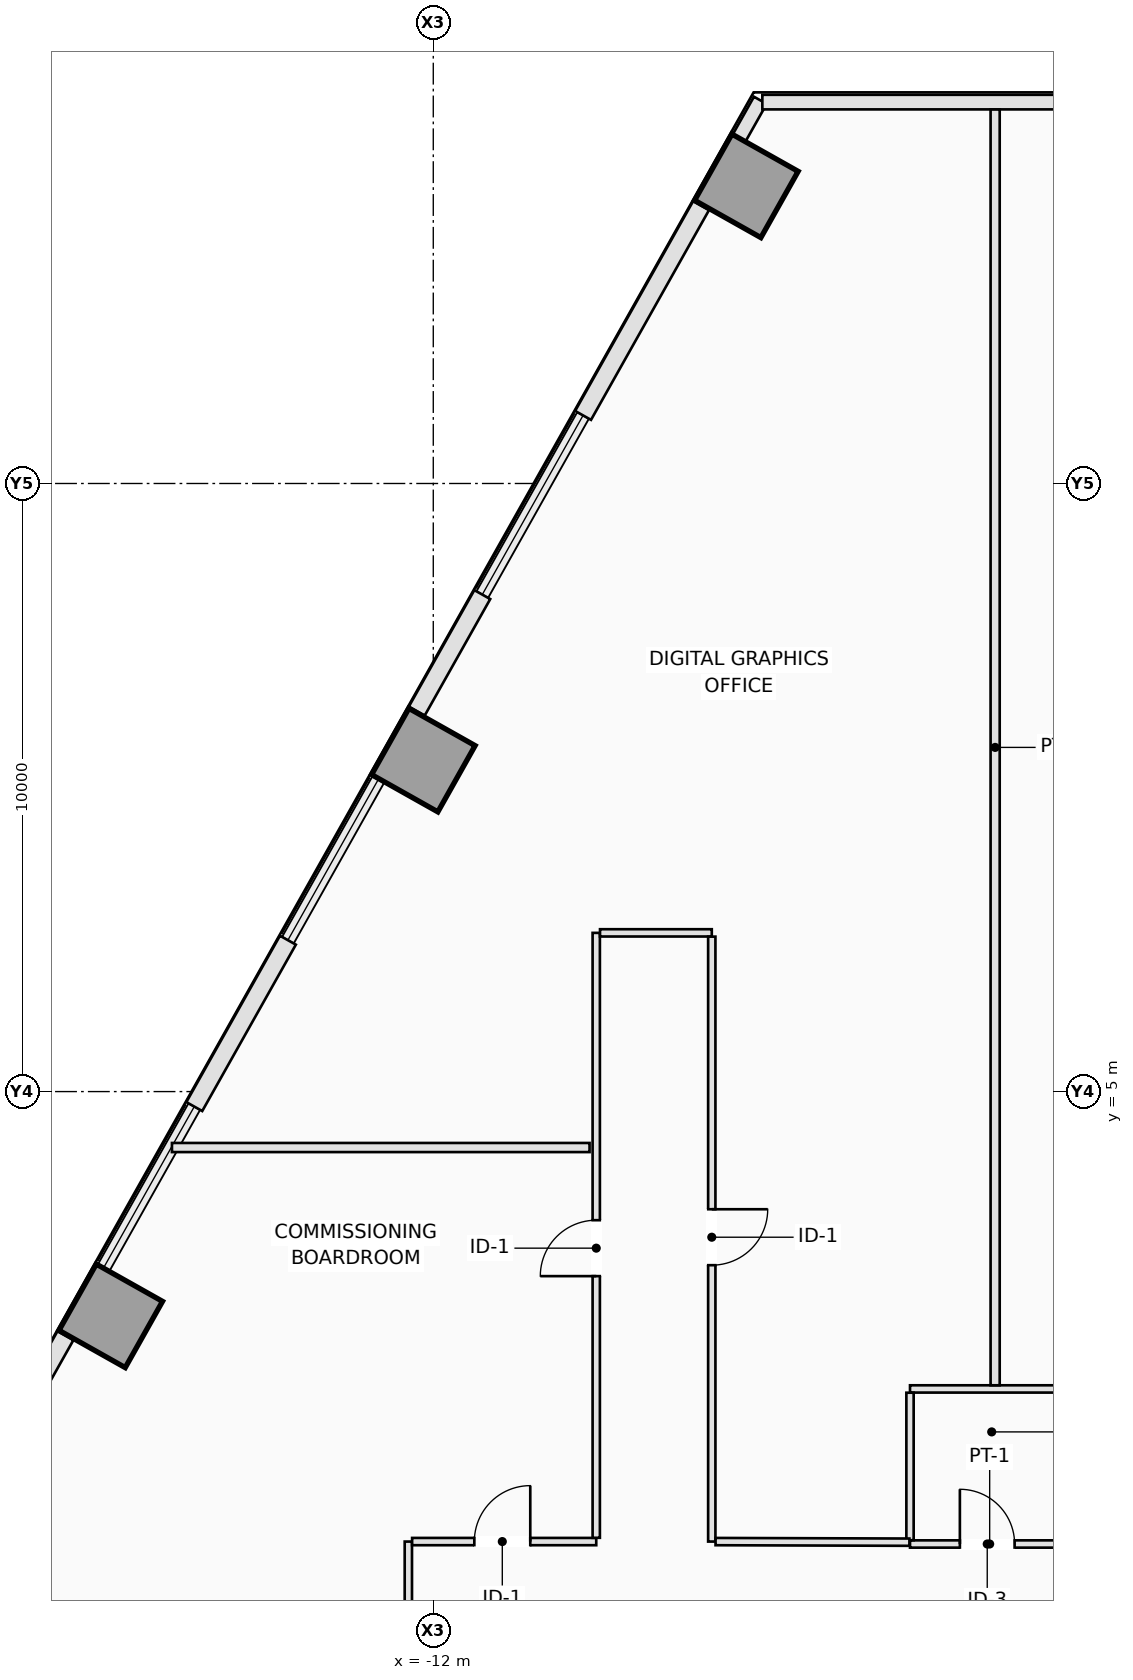
"""IFC4 building model, lengths in metres.
Left out: names, types, materials, properties, quantities, classifications, styles, units other than length and angle.
Written with IfcOpenShell. Run it as: python <this file> out.ifc"""

import sys

from ifc_helpers import new_model, si_unit, direction, frame, frame_2d, origin, origin_2d, place, context, subcontext, project, spatial, rectangle, extrude, element, fill, save


model = new_model("IFC4")
c1 = context("Model", 3, precision=1e-05, world=origin(), true_north=direction((0.0, 1.0)))
c2 = subcontext(c1, "Body", "Model", "MODEL_VIEW")
j1 = project(units=[si_unit("LENGTHUNIT", "METRE"), si_unit("PLANEANGLEUNIT", "RADIAN")], contexts=[c1])
p1 = place(None, origin())
s1 = spatial("IfcSite", under=j1, at=p1, CompositionType="ELEMENT")
p2 = place(p1, origin())
s2 = spatial("IfcBuilding", under=s1, at=p2, CompositionType="ELEMENT")
p3 = place(p2, frame((0.0, 0.0, 62.6)))
s3 = spatial("IfcBuildingStorey", under=s2, at=p3, CompositionType="ELEMENT", Elevation=62.6)
for number, where, z_axis, x_axis in (
    (1, (-6.851, 19.895, 0.0), (0.0, 0.0, 1.0), (-0.872, 0.49, 0.0)),
    (2, (-12.163, 10.451, 0.0), (0.0, 0.0, 1.0), (-0.872, 0.49, 0.0)),
    (3, (-17.304, 1.312, 0.0), (0.0, 0.0, 1.0), (-0.872, 0.49, 0.0)),
):
    element("IfcColumn", number, at=place(p3, frame(where, z_axis=z_axis, x_axis=x_axis)), inside=s3, PredefinedType="COLUMN", context=c2, shape_type="SweptSolid", body=[
        extrude(rectangle(XDim=1.25, YDim=1.25, at=origin_2d()), origin(), (0.0, 0.0, 1.0), 3.5),
    ])
p4 = place(p3, frame((-6.969, 20.684, 0.0), z_axis=(0.0, 0.0, 1.0), x_axis=(0.490261239633, 0.871575537125, 0.0)))
e4 = element("IfcWall", 4, at=p4, inside=s3, PredefinedType="STANDARD", context=c2, shape_type="SweptSolid", body=[
    extrude(rectangle(XDim=0.708, YDim=0.24, at=frame_2d((0.354, 0.0))), origin(), (0.0, 0.0, 1.0), 3.25),
])
p5 = place(p3, frame((-19.127, -0.93, 0.0), z_axis=(0.0, 0.0, 1.0), x_axis=(0.490277063651, 0.871566635925, 0.0)))
e5 = element("IfcWall", 5, at=p5, inside=s3, PredefinedType="STANDARD", context=c2, shape_type="SweptSolid", body=[
    extrude(rectangle(XDim=2.198, YDim=0.3, at=frame_2d((1.099, 0.0))), origin(), (0.0, 0.0, 1.0), 3.25),
])
p6 = place(p3, frame((-12.271, 11.258, 0.0), z_axis=(0.0, 0.0, 1.0), x_axis=(0.490324540864, 0.871539927156, 0.0)))
e6 = element("IfcWall", 6, at=p6, inside=s3, PredefinedType="STANDARD", context=c2, shape_type="SweptSolid", body=[
    extrude(rectangle(XDim=2.197, YDim=0.3, at=frame_2d((1.099, 0.0))), origin(), (0.0, 0.0, 1.0), 3.25),
])
p7 = place(p3, frame((-9.537, 16.12, 0.0), z_axis=(0.0, 0.0, 1.0), x_axis=(0.490240735008, 0.871587070659, 0.0)))
e7 = element("IfcWall", 7, at=p7, inside=s3, PredefinedType="STANDARD", context=c2, shape_type="SweptSolid", body=[
    extrude(rectangle(XDim=3.957, YDim=0.3, at=frame_2d((1.979, 0.0))), origin(), (0.0, 0.0, 1.0), 3.25),
])
p8 = place(p3, frame((-15.93, 4.753, 0.0), z_axis=(0.0, 0.0, 1.0), x_axis=(0.490290775148, 0.871558922738, 0.0)))
e8 = element("IfcWall", 8, at=p8, inside=s3, PredefinedType="STANDARD", context=c2, shape_type="SweptSolid", body=[
    extrude(rectangle(XDim=3.14, YDim=0.3, at=frame_2d((1.57, 0.0))), origin(), (0.0, 0.0, 1.0), 3.25),
])
p9 = place(p3, frame((6.598, 21.272, 0.0), z_axis=(0.0, 0.0, 1.0), x_axis=(-1.0, 0.0, 0.0)))
e9 = element("IfcWall", 9, at=p9, inside=s3, PredefinedType="STANDARD", context=c2, shape_type="SweptSolid", body=[
    extrude(rectangle(XDim=13.187, YDim=0.24, at=frame_2d((6.593, 0.0))), origin(), (0.0, 0.0, 1.0), 3.25),
])
p10 = place(p9, frame((5.693, 0.0, 0.9)))
e10 = element("IfcOpeningElement", 10, at=p10, cuts=e9, PredefinedType="OPENING", context=c2, shape_type="SweptSolid", body=[
    extrude(rectangle(XDim=1.8, YDim=2.1, at=frame_2d((0.9, 1.05))), frame((0.0, 0.13, 0.0), z_axis=(0.0, -1.0, 0.0), x_axis=(1.0, 0.0, 0.0)), (0.0, 0.0, 1.0), 0.26),
])
p11 = place(p3, frame((-4.16, -2.44, 0.0), z_axis=(0.0, 0.0, 1.0), x_axis=(1.0, 0.0, 0.0)))
e11 = element("IfcWall", 11, at=p11, inside=s3, PredefinedType="PARTITIONING", context=c2, shape_type="SweptSolid", body=[
    extrude(rectangle(XDim=2.62, YDim=0.12, at=frame_2d((1.31, 0.0))), origin(), (0.0, 0.0, 1.0), 3.25),
])
p12 = place(p11, frame((0.82, 0.0, 0.0)))
e12 = element("IfcOpeningElement", 12, at=p12, cuts=e11, PredefinedType="OPENING", context=c2, shape_type="SweptSolid", body=[
    extrude(rectangle(XDim=0.9, YDim=2.12, at=frame_2d((0.45, 1.06))), frame((0.0, 0.07, 0.0), z_axis=(0.0, -1.0, 0.0), x_axis=(1.0, 0.0, 0.0)), (0.0, 0.0, 1.0), 0.14),
])
p13 = place(p3, frame((-4.16, 0.11, 0.0), z_axis=(0.0, 0.0, 1.0), x_axis=(1.0, 0.0, 0.0)))
e13 = element("IfcWall", 13, at=p13, inside=s3, PredefinedType="PARTITIONING", context=c2, shape_type="SweptSolid", body=[
    extrude(rectangle(XDim=2.62, YDim=0.12, at=frame_2d((1.31, 0.0))), origin(), (0.0, 0.0, 1.0), 3.25),
])
p14 = place(p3, frame((-4.16, -2.378, 0.0), z_axis=(0.0, 0.0, 1.0), x_axis=(0.0, 1.0, 0.0)))
e14 = element("IfcWall", 14, at=p14, inside=s3, PredefinedType="PARTITIONING", context=c2, shape_type="SweptSolid", body=[
    extrude(rectangle(XDim=2.426, YDim=0.12, at=frame_2d((1.213, 0.0))), origin(), (0.0, 0.0, 1.0), 2.638),
])
p15 = place(p3, frame((-12.41, -4.098, 0.0), z_axis=(0.0, 0.0, 1.0), x_axis=(0.0, 1.0, 0.0)))
e15 = element("IfcWall", 15, at=p15, inside=s3, PredefinedType="PARTITIONING", context=c2, shape_type="SweptSolid", body=[
    extrude(rectangle(XDim=1.698, YDim=0.12, at=frame_2d((0.849, 0.0))), origin(), (0.0, 0.0, 1.0), 3.25),
])
p16 = place(p3, frame((-12.348, -2.4, 0.0), z_axis=(0.0, 0.0, 1.0), x_axis=(1.0, 0.0, 0.0)))
e16 = element("IfcWall", 16, at=p16, inside=s3, PredefinedType="PARTITIONING", context=c2, shape_type="SweptSolid", body=[
    extrude(rectangle(XDim=3.028, YDim=0.12, at=frame_2d((1.514, 0.0))), origin(), (0.0, 0.0, 1.0), 3.25),
])
p17 = place(p16, frame((1.023, 0.0, 0.0)))
e17 = element("IfcOpeningElement", 17, at=p17, cuts=e16, PredefinedType="OPENING", context=c2, shape_type="SweptSolid", body=[
    extrude(rectangle(XDim=0.92, YDim=2.12, at=frame_2d((0.46, 1.06))), frame((0.0, 0.07, 0.0), z_axis=(0.0, -1.0, 0.0), x_axis=(1.0, 0.0, 0.0)), (0.0, 0.0, 1.0), 0.14),
])
p18 = place(p3, frame((-9.32, -2.338, 0.0), z_axis=(0.0, 0.0, 1.0), x_axis=(0.0, 1.0, 0.0)))
e18 = element("IfcWall", 18, at=p18, inside=s3, PredefinedType="PARTITIONING", context=c2, shape_type="SweptSolid", body=[
    extrude(rectangle(XDim=9.948, YDim=0.12, at=frame_2d((4.974, 0.0))), origin(), (0.0, 0.0, 1.0), 3.25),
])
p19 = place(p18, frame((4.303, 0.0, 0.0)))
e19 = element("IfcOpeningElement", 19, at=p19, cuts=e18, PredefinedType="OPENING", context=c2, shape_type="SweptSolid", body=[
    extrude(rectangle(XDim=0.92, YDim=2.12, at=frame_2d((0.46, 1.06))), frame((0.0, 0.07, 0.0), z_axis=(0.0, -1.0, 0.0), x_axis=(1.0, 0.0, 0.0)), (0.0, 0.0, 1.0), 0.14),
])
p20 = place(p3, frame((-9.258, 7.61, 0.0), z_axis=(0.0, 0.0, 1.0), x_axis=(1.0, 0.0, 0.0)))
e20 = element("IfcWall", 20, at=p20, inside=s3, PredefinedType="PARTITIONING", context=c2, shape_type="SweptSolid", body=[
    extrude(rectangle(XDim=1.838, YDim=0.12, at=frame_2d((0.919, 0.0))), origin(), (0.0, 0.0, 1.0), 3.25),
])
p21 = place(p3, frame((-7.42, 7.548, 0.0), z_axis=(0.0, 0.0, 1.0), x_axis=(0.0, -1.0, 0.0)))
e21 = element("IfcWall", 21, at=p21, inside=s3, PredefinedType="PARTITIONING", context=c2, shape_type="SweptSolid", body=[
    extrude(rectangle(XDim=9.948, YDim=0.12, at=frame_2d((4.974, 0.0))), origin(), (0.0, 0.0, 1.0), 3.25),
])
p22 = place(p21, frame((4.483, 0.0, 0.0)))
e22 = element("IfcOpeningElement", 22, at=p22, cuts=e21, PredefinedType="OPENING", context=c2, shape_type="SweptSolid", body=[
    extrude(rectangle(XDim=0.92, YDim=2.12, at=frame_2d((0.46, 1.06))), frame((0.0, 0.07, 0.0), z_axis=(0.0, -1.0, 0.0), x_axis=(1.0, 0.0, 0.0)), (0.0, 0.0, 1.0), 0.14),
])
p23 = place(p3, frame((-7.358, -2.4, 0.0), z_axis=(0.0, 0.0, 1.0), x_axis=(0.999995308264, -0.003063241869, 0.0)))
e23 = element("IfcWall", 23, at=p23, inside=s3, PredefinedType="PARTITIONING", context=c2, shape_type="SweptSolid", body=[
    extrude(rectangle(XDim=3.188, YDim=0.12, at=frame_2d((1.594, 0.0))), origin(), (0.0, 0.0, 1.0), 3.25),
])
p24 = place(p3, frame((-2.76, 0.17, 0.0), z_axis=(0.0, 0.0, 1.0), x_axis=(0.0, 1.0, 0.0)))
e24 = element("IfcWall", 24, at=p24, inside=s3, PredefinedType="PARTITIONING", context=c2, shape_type="SweptSolid", body=[
    extrude(rectangle(XDim=20.98, YDim=0.15, at=frame_2d((10.49, 0.0))), origin(), (0.0, 0.0, 1.0), 3.25),
])
p25 = place(p3, frame((-9.43, 4.08, 0.0), z_axis=(0.0, 0.0, 1.0), x_axis=(-1.0, 0.0, 0.0)))
e25 = element("IfcWall", 25, at=p25, inside=s3, PredefinedType="PARTITIONING", context=c2, shape_type="SweptSolid", body=[
    extrude(rectangle(XDim=6.868, YDim=0.15, at=frame_2d((3.434, 0.0))), origin(), (0.0, 0.0, 1.0), 3.25),
])
p26 = place(p12, origin())
e26 = element("IfcDoor", 26, at=p26, inside=s3, OperationType="SINGLE_SWING_LEFT", PredefinedType="DOOR", context=c2, shape_type="SweptSolid", body=[
    extrude(rectangle(XDim=0.9, YDim=2.12, at=frame_2d((0.45, 1.06))), frame((0.0, 0.025, 0.0), z_axis=(0.0, -1.0, 0.0), x_axis=(1.0, 0.0, 0.0)), (0.0, 0.0, 1.0), 0.05),
])
fill(e12, e26)
p27 = place(p22, origin())
e27 = element("IfcDoor", 27, at=p27, inside=s3, OperationType="SINGLE_SWING_LEFT", PredefinedType="DOOR", context=c2, shape_type="SweptSolid", body=[
    extrude(rectangle(XDim=0.92, YDim=2.12, at=frame_2d((0.46, 1.06))), frame((0.0, 0.025, 0.0), z_axis=(0.0, -1.0, 0.0), x_axis=(1.0, 0.0, 0.0)), (0.0, 0.0, 1.0), 0.05),
])
fill(e22, e27)
p28 = place(p19, origin())
e28 = element("IfcDoor", 28, at=p28, inside=s3, OperationType="SINGLE_SWING_LEFT", PredefinedType="DOOR", context=c2, shape_type="SweptSolid", body=[
    extrude(rectangle(XDim=0.92, YDim=2.12, at=frame_2d((0.46, 1.06))), frame((0.0, 0.025, 0.0), z_axis=(0.0, -1.0, 0.0), x_axis=(1.0, 0.0, 0.0)), (0.0, 0.0, 1.0), 0.05),
])
fill(e19, e28)
p29 = place(p17, origin())
e29 = element("IfcDoor", 29, at=p29, inside=s3, OperationType="SINGLE_SWING_RIGHT", PredefinedType="DOOR", context=c2, shape_type="SweptSolid", body=[
    extrude(rectangle(XDim=0.92, YDim=2.12, at=frame_2d((0.46, 1.06))), frame((0.0, 0.025, 0.0), z_axis=(0.0, -1.0, 0.0), x_axis=(1.0, 0.0, 0.0)), (0.0, 0.0, 1.0), 0.05),
])
fill(e17, e29)
save(model, sys.argv[1])
